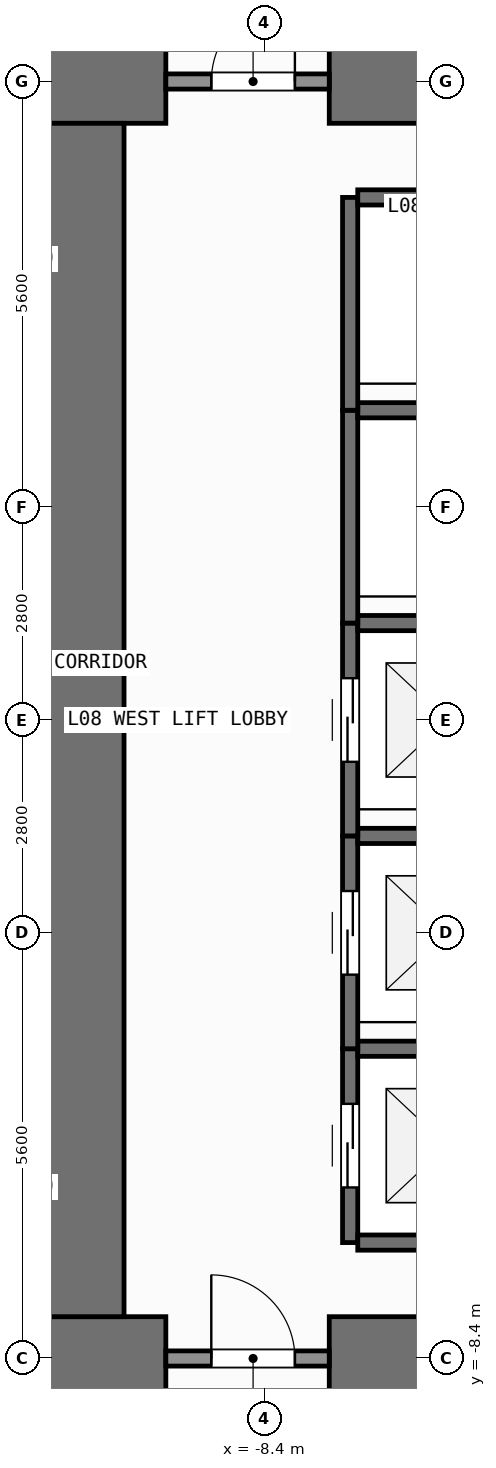
"""IFC4 building model, lengths in metres.
Left out: names, types, materials, properties, quantities, classifications, styles, units other than length and angle.
Written with IfcOpenShell. Run it as: python <this file> out.ifc"""

import sys

from ifc_helpers import new_model, si_unit, direction, frame, frame_2d, origin, place, context, subcontext, project, spatial, rectangle, extrude, element, fill, save


model = new_model("IFC4")
c1 = context("Model", 3, precision=1e-05, world=origin(), true_north=direction((0.0, 1.0)))
c2 = subcontext(c1, "Body", "Model", "MODEL_VIEW")
j1 = project(units=[si_unit("LENGTHUNIT", "METRE"), si_unit("PLANEANGLEUNIT", "RADIAN")], contexts=[c1])
p1 = place(None, origin())
s1 = spatial("IfcSite", under=j1, at=p1, CompositionType="ELEMENT")
p2 = place(p1, origin())
s2 = spatial("IfcBuilding", under=s1, at=p2, CompositionType="ELEMENT")
p3 = place(p2, frame((0.0, 0.0, 30.6)))
s3 = spatial("IfcBuildingStorey", under=s2, at=p3, CompositionType="ELEMENT", Elevation=30.6)
p4 = place(p3, frame((-11.35, -8.4, 0.0), z_axis=(0.0, 0.0, 1.0), x_axis=(1.0, 0.0, 0.0)))
e1 = element("IfcWall", 1, at=p4, inside=s3, PredefinedType="SHEAR", context=c2, shape_type="SweptSolid", body=[
    extrude(rectangle(XDim=1.65, YDim=1.1, at=frame_2d((0.825, 0.0))), origin(), (0.0, 0.0, 1.0), 3.9),
])
p5 = place(p3, frame((-7.55, -8.4, 0.0), z_axis=(0.0, 0.0, 1.0), x_axis=(1.0, 0.0, 0.0)))
e2 = element("IfcWall", 2, at=p5, inside=s3, PredefinedType="SHEAR", context=c2, shape_type="SweptSolid", body=[
    extrude(rectangle(XDim=3.35, YDim=1.1, at=frame_2d((1.675, 0.0))), origin(), (0.0, 0.0, 1.0), 3.9),
])
p6 = place(p3, frame((-11.35, 8.4, 0.0), z_axis=(0.0, 0.0, 1.0), x_axis=(1.0, 0.0, 0.0)))
e3 = element("IfcWall", 3, at=p6, inside=s3, PredefinedType="SHEAR", context=c2, shape_type="SweptSolid", body=[
    extrude(rectangle(XDim=1.65, YDim=1.1, at=frame_2d((0.825, 0.0))), origin(), (0.0, 0.0, 1.0), 3.9),
])
p7 = place(p3, frame((-7.55, 8.4, 0.0), z_axis=(0.0, 0.0, 1.0), x_axis=(1.0, 0.0, 0.0)))
e4 = element("IfcWall", 4, at=p7, inside=s3, PredefinedType="SHEAR", context=c2, shape_type="SweptSolid", body=[
    extrude(rectangle(XDim=16.5, YDim=1.1, at=frame_2d((8.25, 0.0))), origin(), (0.0, 0.0, 1.0), 3.9),
])
p8 = place(p3, frame((-10.8, -7.85, 0.0), z_axis=(0.0, 0.0, 1.0), x_axis=(0.0, 1.0, 0.0)))
e5 = element("IfcWall", 5, at=p8, inside=s3, PredefinedType="SHEAR", context=c2, shape_type="SweptSolid", body=[
    extrude(rectangle(XDim=15.7, YDim=1.1, at=frame_2d((7.85, 0.0))), origin(), (0.0, 0.0, 1.0), 3.9),
])
p9 = place(p3, frame((-7.275, -6.875, 0.0), z_axis=(0.0, 0.0, 1.0), x_axis=(0.0, 1.0, 0.0)))
e6 = element("IfcWall", 6, at=p9, inside=s3, PredefinedType="SHEAR", context=c2, shape_type="SweptSolid", body=[
    extrude(rectangle(XDim=2.55, YDim=0.2, at=frame_2d((1.275, 0.0))), origin(), (0.0, 0.0, 1.0), 3.68),
])
p10 = place(p9, frame((0.725, 0.0, 0.0)))
e7 = element("IfcOpeningElement", 7, at=p10, cuts=e6, PredefinedType="OPENING", context=c2, shape_type="SweptSolid", body=[
    extrude(rectangle(XDim=1.1, YDim=2.2, at=frame_2d((0.55, 1.1))), frame((0.0, 0.11, 0.0), z_axis=(0.0, -1.0, 0.0), x_axis=(1.0, 0.0, 0.0)), (0.0, 0.0, 1.0), 0.22),
])
for number, where, z_axis, x_axis in (
    (8, (-7.175, -6.875, 0.0), (0.0, 0.0, 1.0), (1.0, 0.0, 0.0)),
    (9, (-7.175, -4.325, 0.0), (0.0, 0.0, 1.0), (1.0, 0.0, 0.0)),
):
    element("IfcWall", number, at=place(p3, frame(where, z_axis=z_axis, x_axis=x_axis)), inside=s3, PredefinedType="SHEAR", context=c2, shape_type="SweptSolid", body=[
        extrude(rectangle(XDim=2.35, YDim=0.2, at=frame_2d((1.175, 0.0))), origin(), (0.0, 0.0, 1.0), 3.68),
    ])
p11 = place(p3, frame((-7.275, -4.325, 0.0), z_axis=(0.0, 0.0, 1.0), x_axis=(0.0, 1.0, 0.0)))
e10 = element("IfcWall", 10, at=p11, inside=s3, PredefinedType="SHEAR", context=c2, shape_type="SweptSolid", body=[
    extrude(rectangle(XDim=2.8, YDim=0.2, at=frame_2d((1.4, 0.0))), origin(), (0.0, 0.0, 1.0), 3.68),
])
p12 = place(p11, frame((0.975, 0.0, 0.0)))
e11 = element("IfcOpeningElement", 11, at=p12, cuts=e10, PredefinedType="OPENING", context=c2, shape_type="SweptSolid", body=[
    extrude(rectangle(XDim=1.1, YDim=2.2, at=frame_2d((0.55, 1.1))), frame((0.0, 0.11, 0.0), z_axis=(0.0, -1.0, 0.0), x_axis=(1.0, 0.0, 0.0)), (0.0, 0.0, 1.0), 0.22),
])
p13 = place(p3, frame((-7.175, -1.525, 0.0), z_axis=(0.0, 0.0, 1.0), x_axis=(1.0, 0.0, 0.0)))
e12 = element("IfcWall", 12, at=p13, inside=s3, PredefinedType="SHEAR", context=c2, shape_type="SweptSolid", body=[
    extrude(rectangle(XDim=2.35, YDim=0.2, at=frame_2d((1.175, 0.0))), origin(), (0.0, 0.0, 1.0), 3.68),
])
p14 = place(p3, frame((-7.275, -1.525, 0.0), z_axis=(0.0, 0.0, 1.0), x_axis=(0.0, 1.0, 0.0)))
e13 = element("IfcWall", 13, at=p14, inside=s3, PredefinedType="SHEAR", context=c2, shape_type="SweptSolid", body=[
    extrude(rectangle(XDim=2.8, YDim=0.2, at=frame_2d((1.4, 0.0))), origin(), (0.0, 0.0, 1.0), 3.68),
])
p15 = place(p14, frame((0.975, 0.0, 0.0)))
e14 = element("IfcOpeningElement", 14, at=p15, cuts=e13, PredefinedType="OPENING", context=c2, shape_type="SweptSolid", body=[
    extrude(rectangle(XDim=1.1, YDim=2.2, at=frame_2d((0.55, 1.1))), frame((0.0, 0.11, 0.0), z_axis=(0.0, -1.0, 0.0), x_axis=(1.0, 0.0, 0.0)), (0.0, 0.0, 1.0), 0.22),
])
p16 = place(p3, frame((-7.175, 1.275, 0.0), z_axis=(0.0, 0.0, 1.0), x_axis=(1.0, 0.0, 0.0)))
e15 = element("IfcWall", 15, at=p16, inside=s3, PredefinedType="SHEAR", context=c2, shape_type="SweptSolid", body=[
    extrude(rectangle(XDim=2.35, YDim=0.2, at=frame_2d((1.175, 0.0))), origin(), (0.0, 0.0, 1.0), 3.68),
])
p17 = place(p3, frame((-7.275, 1.275, 0.0), z_axis=(0.0, 0.0, 1.0), x_axis=(0.0, 1.0, 0.0)))
e16 = element("IfcWall", 16, at=p17, inside=s3, PredefinedType="SHEAR", context=c2, shape_type="SweptSolid", body=[
    extrude(rectangle(XDim=2.8, YDim=0.2, at=frame_2d((1.4, 0.0))), origin(), (0.0, 0.0, 1.0), 3.68),
])
p18 = place(p3, frame((-7.175, 4.075, 0.0), z_axis=(0.0, 0.0, 1.0), x_axis=(1.0, 0.0, 0.0)))
e17 = element("IfcWall", 17, at=p18, inside=s3, PredefinedType="SHEAR", context=c2, shape_type="SweptSolid", body=[
    extrude(rectangle(XDim=2.35, YDim=0.2, at=frame_2d((1.175, 0.0))), origin(), (0.0, 0.0, 1.0), 3.68),
])
p19 = place(p3, frame((-7.275, 4.075, 0.0), z_axis=(0.0, 0.0, 1.0), x_axis=(0.0, 1.0, 0.0)))
e18 = element("IfcWall", 18, at=p19, inside=s3, PredefinedType="SHEAR", context=c2, shape_type="SweptSolid", body=[
    extrude(rectangle(XDim=2.8, YDim=0.2, at=frame_2d((1.4, 0.0))), origin(), (0.0, 0.0, 1.0), 3.68),
])
p20 = place(p3, frame((-7.175, 6.875, 0.0), z_axis=(0.0, 0.0, 1.0), x_axis=(1.0, 0.0, 0.0)))
e19 = element("IfcWall", 19, at=p20, inside=s3, PredefinedType="SHEAR", context=c2, shape_type="SweptSolid", body=[
    extrude(rectangle(XDim=2.35, YDim=0.2, at=frame_2d((1.175, 0.0))), origin(), (0.0, 0.0, 1.0), 3.68),
])
p21 = place(p3, frame((-9.7, -8.4, 0.0), z_axis=(0.0, 0.0, 1.0), x_axis=(1.0, 0.0, 0.0)))
e20 = element("IfcWall", 20, at=p21, inside=s3, PredefinedType="SOLIDWALL", context=c2, shape_type="SweptSolid", body=[
    extrude(rectangle(XDim=2.15, YDim=0.2, at=frame_2d((1.075, 0.0))), origin(), (0.0, 0.0, 1.0), 2.72),
])
p22 = place(p21, frame((0.598, 0.0, 0.0)))
e21 = element("IfcOpeningElement", 21, at=p22, cuts=e20, PredefinedType="OPENING", context=c2, shape_type="SweptSolid", body=[
    extrude(rectangle(XDim=1.1, YDim=2.15, at=frame_2d((0.55, 1.075))), frame((0.0, 0.11, 0.0), z_axis=(0.0, -1.0, 0.0), x_axis=(1.0, 0.0, 0.0)), (0.0, 0.0, 1.0), 0.22),
])
p23 = place(p3, frame((-9.7, 8.4, 0.0), z_axis=(0.0, 0.0, 1.0), x_axis=(1.0, 0.0, 0.0)))
e22 = element("IfcWall", 22, at=p23, inside=s3, PredefinedType="SOLIDWALL", context=c2, shape_type="SweptSolid", body=[
    extrude(rectangle(XDim=2.15, YDim=0.2, at=frame_2d((1.075, 0.0))), origin(), (0.0, 0.0, 1.0), 2.72),
])
p24 = place(p23, frame((0.598, 0.0, 0.0)))
e23 = element("IfcOpeningElement", 23, at=p24, cuts=e22, PredefinedType="OPENING", context=c2, shape_type="SweptSolid", body=[
    extrude(rectangle(XDim=1.1, YDim=2.15, at=frame_2d((0.55, 1.075))), frame((0.0, 0.11, 0.0), z_axis=(0.0, -1.0, 0.0), x_axis=(1.0, 0.0, 0.0)), (0.0, 0.0, 1.0), 0.22),
])
p25 = place(p10, origin())
e24 = element("IfcDoor", 24, at=p25, inside=s3, OperationType="SLIDING_TO_LEFT", PredefinedType="DOOR", context=c2, shape_type="SweptSolid", body=[
    extrude(rectangle(XDim=1.1, YDim=2.2, at=frame_2d((0.55, 1.1))), frame((0.0, 0.025, 0.0), z_axis=(0.0, -1.0, 0.0), x_axis=(1.0, 0.0, 0.0)), (0.0, 0.0, 1.0), 0.05),
])
fill(e7, e24)
p26 = place(p12, origin())
e25 = element("IfcDoor", 25, at=p26, inside=s3, OperationType="SLIDING_TO_LEFT", PredefinedType="DOOR", context=c2, shape_type="SweptSolid", body=[
    extrude(rectangle(XDim=1.1, YDim=2.2, at=frame_2d((0.55, 1.1))), frame((0.0, 0.025, 0.0), z_axis=(0.0, -1.0, 0.0), x_axis=(1.0, 0.0, 0.0)), (0.0, 0.0, 1.0), 0.05),
])
fill(e11, e25)
p27 = place(p15, origin())
e26 = element("IfcDoor", 26, at=p27, inside=s3, OperationType="SLIDING_TO_LEFT", PredefinedType="DOOR", context=c2, shape_type="SweptSolid", body=[
    extrude(rectangle(XDim=1.1, YDim=2.2, at=frame_2d((0.55, 1.1))), frame((0.0, 0.025, 0.0), z_axis=(0.0, -1.0, 0.0), x_axis=(1.0, 0.0, 0.0)), (0.0, 0.0, 1.0), 0.05),
])
fill(e14, e26)
p28 = place(p22, origin())
e27 = element("IfcDoor", 27, at=p28, inside=s3, OperationType="SINGLE_SWING_LEFT", PredefinedType="DOOR", context=c2, shape_type="SweptSolid", body=[
    extrude(rectangle(XDim=1.1, YDim=2.15, at=frame_2d((0.55, 1.075))), frame((0.0, 0.025, 0.0), z_axis=(0.0, -1.0, 0.0), x_axis=(1.0, 0.0, 0.0)), (0.0, 0.0, 1.0), 0.05),
])
fill(e21, e27)
p29 = place(p24, origin())
e28 = element("IfcDoor", 28, at=p29, inside=s3, OperationType="SINGLE_SWING_RIGHT", PredefinedType="DOOR", context=c2, shape_type="SweptSolid", body=[
    extrude(rectangle(XDim=1.1, YDim=2.15, at=frame_2d((0.55, 1.075))), frame((0.0, 0.025, 0.0), z_axis=(0.0, -1.0, 0.0), x_axis=(1.0, 0.0, 0.0)), (0.0, 0.0, 1.0), 0.05),
])
fill(e23, e28)
save(model, sys.argv[1])
